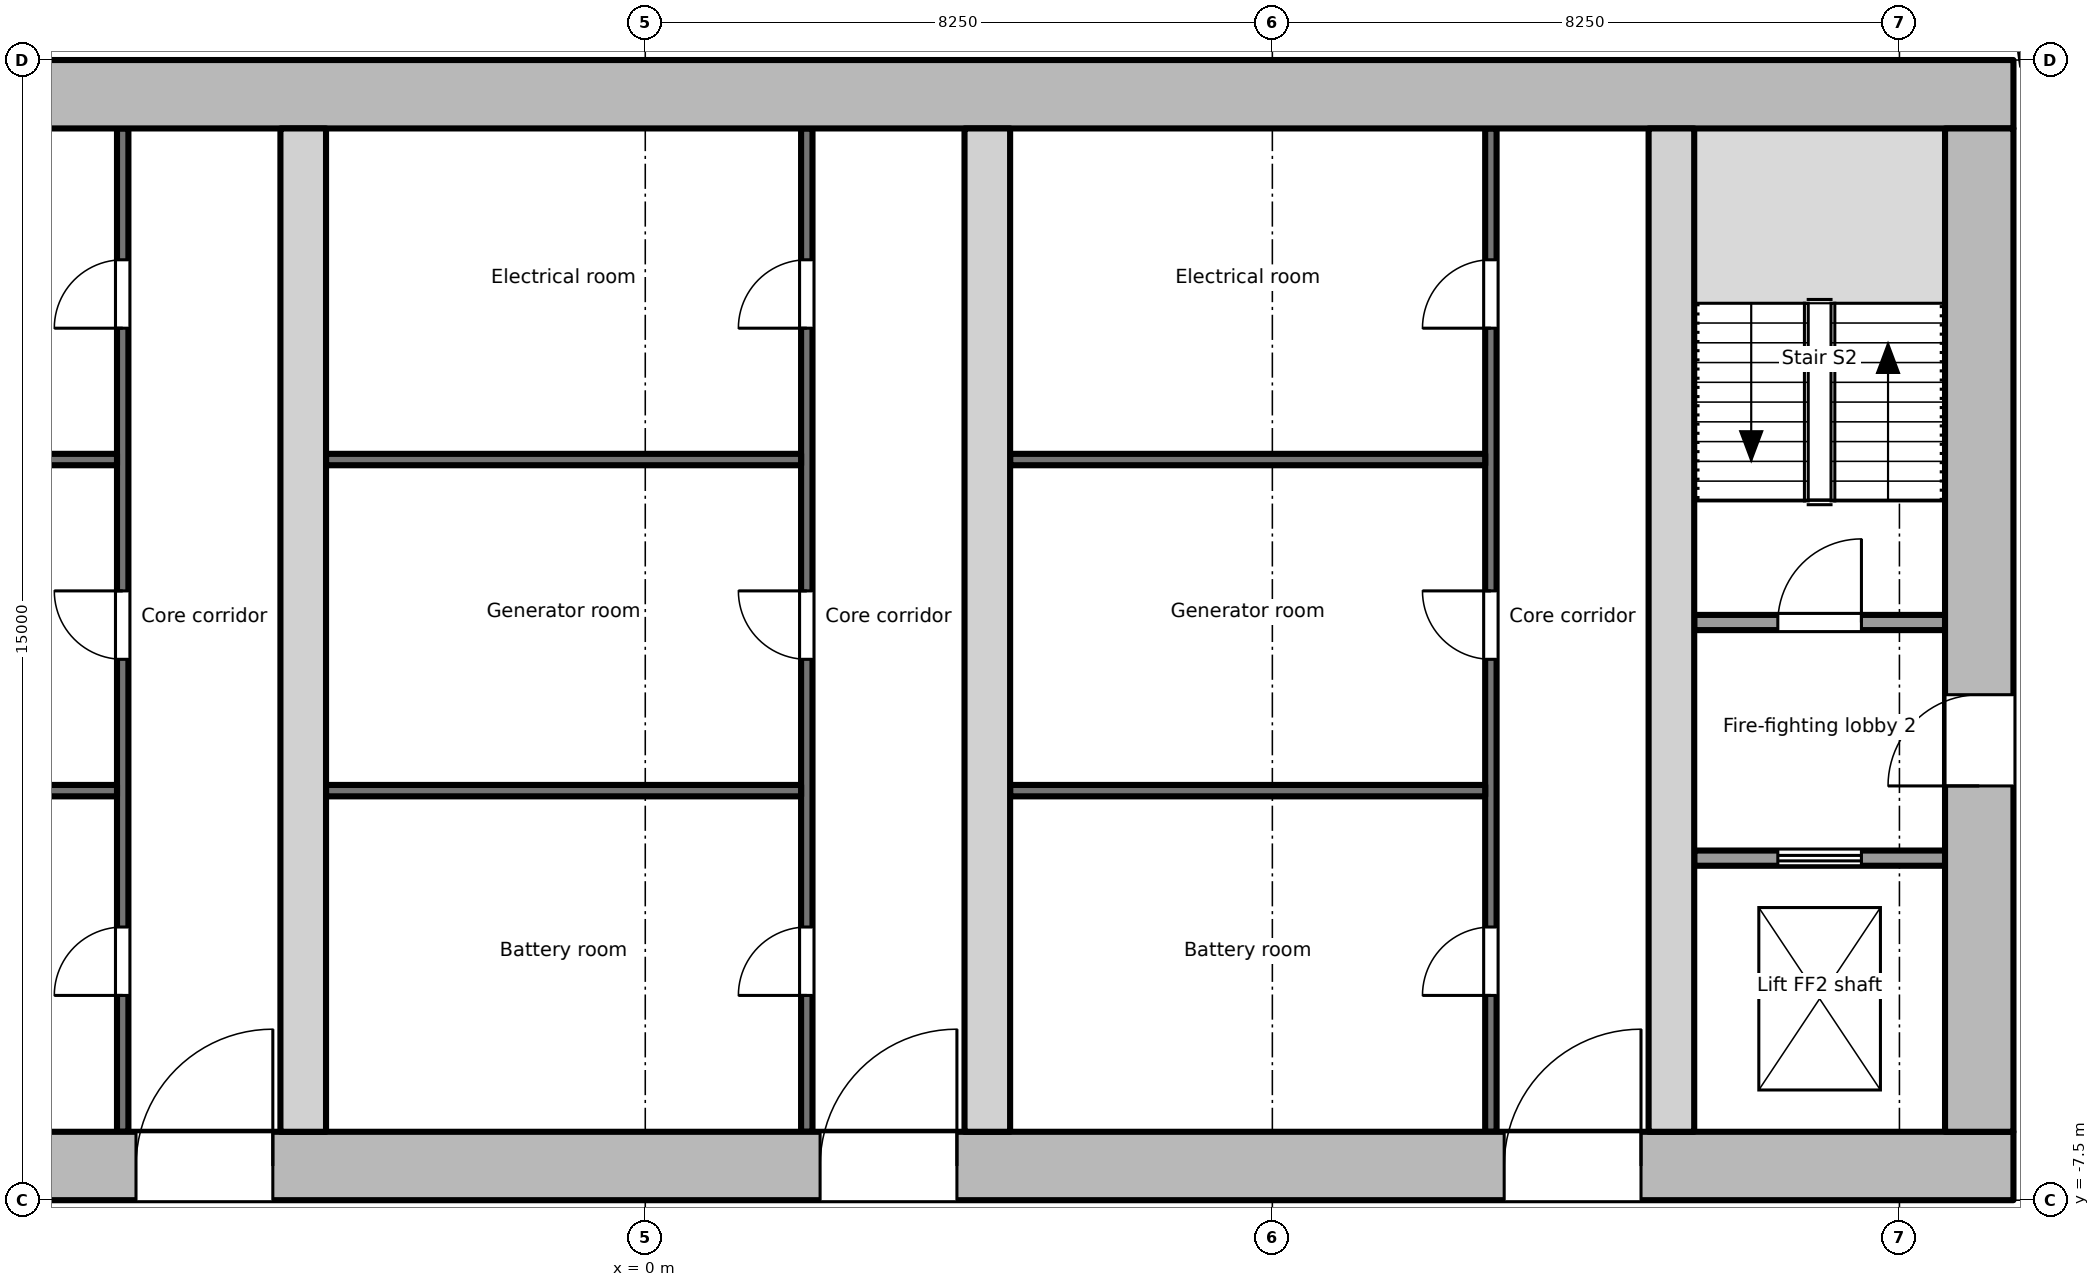
"""IFC4 building model, lengths in metres.
Left out: names, types, materials, properties, quantities, classifications, styles, units other than length and angle.
Written with IfcOpenShell. Run it as: python <this file> out.ifc"""

import sys

from ifc_helpers import new_model, si_unit, direction, frame, frame_2d, origin, place, context, subcontext, project, spatial, rectangle, extrude, element, fill, save


model = new_model("IFC4")
c1 = context("Model", 3, precision=1e-05, world=origin(), true_north=direction((0.0, 1.0)))
c2 = subcontext(c1, "Body", "Model", "MODEL_VIEW")
j1 = project(units=[si_unit("LENGTHUNIT", "METRE"), si_unit("PLANEANGLEUNIT", "RADIAN")], contexts=[c1])
p1 = place(None, origin())
s1 = spatial("IfcSite", under=j1, at=p1, CompositionType="ELEMENT")
p2 = place(p1, origin())
s2 = spatial("IfcBuilding", under=s1, at=p2, CompositionType="ELEMENT")
p3 = place(p2, frame((0.0, 0.0, 296.3)))
s3 = spatial("IfcBuildingStorey", under=s2, at=p3, CompositionType="ELEMENT", Elevation=296.3)
p4 = place(p3, frame((-18.0, -7.05, -0.2), z_axis=(0.0, 0.0, 1.0), x_axis=(1.0, 0.0, 0.0)))
e1 = element("IfcWall", 1, at=p4, inside=s3, PredefinedType="SHEAR", context=c2, shape_type="SweptSolid", body=[
    extrude(rectangle(XDim=36.0, YDim=0.9, at=frame_2d((18.0, 0.0))), origin(), (0.0, 0.0, 1.0), 4.0),
])
p5 = place(p4, frame((11.3, 0.0, 0.2)))
e2 = element("IfcOpeningElement", 2, at=p5, cuts=e1, PredefinedType="OPENING", context=c2, shape_type="SweptSolid", body=[
    extrude(rectangle(XDim=1.8, YDim=2.1, at=frame_2d((0.9, 1.05))), frame((0.0, 0.46, 0.0), z_axis=(0.0, -1.0, 0.0), x_axis=(1.0, 0.0, 0.0)), (0.0, 0.0, 1.0), 0.921),
])
p6 = place(p4, frame((20.3, 0.0, 0.2)))
e3 = element("IfcOpeningElement", 3, at=p6, cuts=e1, PredefinedType="OPENING", context=c2, shape_type="SweptSolid", body=[
    extrude(rectangle(XDim=1.8, YDim=2.1, at=frame_2d((0.9, 1.05))), frame((0.0, 0.46, 0.0), z_axis=(0.0, -1.0, 0.0), x_axis=(1.0, 0.0, 0.0)), (0.0, 0.0, 1.0), 0.921),
])
p7 = place(p4, frame((29.3, 0.0, 0.2)))
e4 = element("IfcOpeningElement", 4, at=p7, cuts=e1, PredefinedType="OPENING", context=c2, shape_type="SweptSolid", body=[
    extrude(rectangle(XDim=1.8, YDim=2.1, at=frame_2d((0.9, 1.05))), frame((0.0, 0.46, 0.0), z_axis=(0.0, -1.0, 0.0), x_axis=(1.0, 0.0, 0.0)), (0.0, 0.0, 1.0), 0.921),
])
p8 = place(p3, frame((-18.0, 7.05, -0.2), z_axis=(0.0, 0.0, 1.0), x_axis=(1.0, 0.0, 0.0)))
e5 = element("IfcWall", 5, at=p8, inside=s3, PredefinedType="SHEAR", context=c2, shape_type="SweptSolid", body=[
    extrude(rectangle(XDim=36.0, YDim=0.9, at=frame_2d((18.0, 0.0))), origin(), (0.0, 0.0, 1.0), 4.0),
])
p9 = place(p3, frame((17.55, -6.6, -0.2), z_axis=(0.0, 0.0, 1.0), x_axis=(0.0, 1.0, 0.0)))
e6 = element("IfcWall", 6, at=p9, inside=s3, PredefinedType="SHEAR", context=c2, shape_type="SweptSolid", body=[
    extrude(rectangle(XDim=13.2, YDim=0.9, at=frame_2d((6.6, 0.0))), origin(), (0.0, 0.0, 1.0), 4.0),
])
p10 = place(p9, frame((4.55, 0.0, 0.2)))
e7 = element("IfcOpeningElement", 7, at=p10, cuts=e6, PredefinedType="OPENING", context=c2, shape_type="SweptSolid", body=[
    extrude(rectangle(XDim=1.2, YDim=2.1, at=frame_2d((0.6, 1.05))), frame((0.0, 0.46, 0.0), z_axis=(0.0, -1.0, 0.0), x_axis=(1.0, 0.0, 0.0)), (0.0, 0.0, 1.0), 0.921),
])
for number, where, z_axis, x_axis in (
    (8, (-4.5, -6.6, -0.2), (0.0, 0.0, 1.0), (0.0, 1.0, 0.0)),
    (9, (4.5, -6.6, -0.2), (0.0, 0.0, 1.0), (0.0, 1.0, 0.0)),
    (10, (13.5, -6.6, -0.2), (0.0, 0.0, 1.0), (0.0, 1.0, 0.0)),
):
    element("IfcWall", number, at=place(p3, frame(where, z_axis=z_axis, x_axis=x_axis)), inside=s3, PredefinedType="SHEAR", context=c2, shape_type="SweptSolid", body=[
        extrude(rectangle(XDim=13.2, YDim=0.6, at=frame_2d((6.6, 0.0))), origin(), (0.0, 0.0, 1.0), 4.0),
    ])
p11 = place(p3, frame((13.8, -3.0, 0.0), z_axis=(0.0, 0.0, 1.0), x_axis=(1.0, 0.0, 0.0)))
e11 = element("IfcWall", 11, at=p11, inside=s3, PredefinedType="PARTITIONING", context=c2, shape_type="SweptSolid", body=[
    extrude(rectangle(XDim=3.3, YDim=0.2, at=frame_2d((1.65, 0.0))), origin(), (0.0, 0.0, 1.0), 3.8),
])
p12 = place(p11, frame((1.1, 0.0, 0.0)))
e12 = element("IfcOpeningElement", 12, at=p12, cuts=e11, PredefinedType="OPENING", context=c2, shape_type="SweptSolid", body=[
    extrude(rectangle(XDim=1.1, YDim=2.1, at=frame_2d((0.55, 1.05))), frame((0.0, 0.111, 0.0), z_axis=(0.0, -1.0, 0.0), x_axis=(1.0, 0.0, 0.0)), (0.0, 0.0, 1.0), 0.221),
])
p13 = place(p3, frame((13.8, 0.1, 0.0), z_axis=(0.0, 0.0, 1.0), x_axis=(1.0, 0.0, 0.0)))
e13 = element("IfcWall", 13, at=p13, inside=s3, PredefinedType="PARTITIONING", context=c2, shape_type="SweptSolid", body=[
    extrude(rectangle(XDim=3.3, YDim=0.2, at=frame_2d((1.65, 0.0))), origin(), (0.0, 0.0, 1.0), 3.8),
])
p14 = place(p13, frame((1.1, 0.0, 0.0)))
e14 = element("IfcOpeningElement", 14, at=p14, cuts=e13, PredefinedType="OPENING", context=c2, shape_type="SweptSolid", body=[
    extrude(rectangle(XDim=1.1, YDim=2.1, at=frame_2d((0.55, 1.05))), frame((0.0, 0.111, 0.0), z_axis=(0.0, -1.0, 0.0), x_axis=(1.0, 0.0, 0.0)), (0.0, 0.0, 1.0), 0.221),
])
p15 = place(p3, frame((-6.875, -6.6, 0.0), z_axis=(0.0, 0.0, 1.0), x_axis=(0.0, 1.0, 0.0)))
e15 = element("IfcWall", 15, at=p15, inside=s3, PredefinedType="PARTITIONING", context=c2, shape_type="SweptSolid", body=[
    extrude(rectangle(XDim=13.2, YDim=0.15, at=frame_2d((6.6, 0.0))), origin(), (0.0, 0.0, 1.0), 3.8),
])
p16 = place(p15, frame((1.794, 0.0, 0.0)))
e16 = element("IfcOpeningElement", 16, at=p16, cuts=e15, PredefinedType="OPENING", context=c2, shape_type="SweptSolid", body=[
    extrude(rectangle(XDim=0.9, YDim=2.1, at=frame_2d((0.45, 1.05))), frame((0.0, 0.085, 0.0), z_axis=(0.0, -1.0, 0.0), x_axis=(1.0, 0.0, 0.0)), (0.0, 0.0, 1.0), 0.171),
])
p17 = place(p15, frame((6.216, 0.0, 0.0)))
e17 = element("IfcOpeningElement", 17, at=p17, cuts=e15, PredefinedType="OPENING", context=c2, shape_type="SweptSolid", body=[
    extrude(rectangle(XDim=0.9, YDim=2.1, at=frame_2d((0.45, 1.05))), frame((0.0, 0.085, 0.0), z_axis=(0.0, -1.0, 0.0), x_axis=(1.0, 0.0, 0.0)), (0.0, 0.0, 1.0), 0.171),
])
p18 = place(p15, frame((10.572, 0.0, 0.0)))
e18 = element("IfcOpeningElement", 18, at=p18, cuts=e15, PredefinedType="OPENING", context=c2, shape_type="SweptSolid", body=[
    extrude(rectangle(XDim=0.9, YDim=2.1, at=frame_2d((0.45, 1.05))), frame((0.0, 0.085, 0.0), z_axis=(0.0, -1.0, 0.0), x_axis=(1.0, 0.0, 0.0)), (0.0, 0.0, 1.0), 0.171),
])
for number, where, z_axis, x_axis in (
    (19, (-13.2, -2.112, 0.0), (0.0, 0.0, 1.0), (1.0, 0.0, 0.0)),
    (20, (-13.2, 2.244, 0.0), (0.0, 0.0, 1.0), (1.0, 0.0, 0.0)),
):
    element("IfcWall", number, at=place(p3, frame(where, z_axis=z_axis, x_axis=x_axis)), inside=s3, PredefinedType="PARTITIONING", context=c2, shape_type="SweptSolid", body=[
        extrude(rectangle(XDim=6.25, YDim=0.15, at=frame_2d((3.125, 0.0))), origin(), (0.0, 0.0, 1.0), 3.8),
    ])
p19 = place(p3, frame((2.125, -6.6, 0.0), z_axis=(0.0, 0.0, 1.0), x_axis=(0.0, 1.0, 0.0)))
e21 = element("IfcWall", 21, at=p19, inside=s3, PredefinedType="PARTITIONING", context=c2, shape_type="SweptSolid", body=[
    extrude(rectangle(XDim=13.2, YDim=0.15, at=frame_2d((6.6, 0.0))), origin(), (0.0, 0.0, 1.0), 3.8),
])
p20 = place(p19, frame((1.794, 0.0, 0.0)))
e22 = element("IfcOpeningElement", 22, at=p20, cuts=e21, PredefinedType="OPENING", context=c2, shape_type="SweptSolid", body=[
    extrude(rectangle(XDim=0.9, YDim=2.1, at=frame_2d((0.45, 1.05))), frame((0.0, 0.085, 0.0), z_axis=(0.0, -1.0, 0.0), x_axis=(1.0, 0.0, 0.0)), (0.0, 0.0, 1.0), 0.171),
])
p21 = place(p19, frame((6.216, 0.0, 0.0)))
e23 = element("IfcOpeningElement", 23, at=p21, cuts=e21, PredefinedType="OPENING", context=c2, shape_type="SweptSolid", body=[
    extrude(rectangle(XDim=0.9, YDim=2.1, at=frame_2d((0.45, 1.05))), frame((0.0, 0.085, 0.0), z_axis=(0.0, -1.0, 0.0), x_axis=(1.0, 0.0, 0.0)), (0.0, 0.0, 1.0), 0.171),
])
p22 = place(p19, frame((10.572, 0.0, 0.0)))
e24 = element("IfcOpeningElement", 24, at=p22, cuts=e21, PredefinedType="OPENING", context=c2, shape_type="SweptSolid", body=[
    extrude(rectangle(XDim=0.9, YDim=2.1, at=frame_2d((0.45, 1.05))), frame((0.0, 0.085, 0.0), z_axis=(0.0, -1.0, 0.0), x_axis=(1.0, 0.0, 0.0)), (0.0, 0.0, 1.0), 0.171),
])
for number, where, z_axis, x_axis in (
    (25, (-4.2, -2.112, 0.0), (0.0, 0.0, 1.0), (1.0, 0.0, 0.0)),
    (26, (-4.2, 2.244, 0.0), (0.0, 0.0, 1.0), (1.0, 0.0, 0.0)),
):
    element("IfcWall", number, at=place(p3, frame(where, z_axis=z_axis, x_axis=x_axis)), inside=s3, PredefinedType="PARTITIONING", context=c2, shape_type="SweptSolid", body=[
        extrude(rectangle(XDim=6.25, YDim=0.15, at=frame_2d((3.125, 0.0))), origin(), (0.0, 0.0, 1.0), 3.8),
    ])
p23 = place(p3, frame((11.125, -6.6, 0.0), z_axis=(0.0, 0.0, 1.0), x_axis=(0.0, 1.0, 0.0)))
e27 = element("IfcWall", 27, at=p23, inside=s3, PredefinedType="PARTITIONING", context=c2, shape_type="SweptSolid", body=[
    extrude(rectangle(XDim=13.2, YDim=0.15, at=frame_2d((6.6, 0.0))), origin(), (0.0, 0.0, 1.0), 3.8),
])
p24 = place(p23, frame((1.794, 0.0, 0.0)))
e28 = element("IfcOpeningElement", 28, at=p24, cuts=e27, PredefinedType="OPENING", context=c2, shape_type="SweptSolid", body=[
    extrude(rectangle(XDim=0.9, YDim=2.1, at=frame_2d((0.45, 1.05))), frame((0.0, 0.085, 0.0), z_axis=(0.0, -1.0, 0.0), x_axis=(1.0, 0.0, 0.0)), (0.0, 0.0, 1.0), 0.171),
])
p25 = place(p23, frame((6.216, 0.0, 0.0)))
e29 = element("IfcOpeningElement", 29, at=p25, cuts=e27, PredefinedType="OPENING", context=c2, shape_type="SweptSolid", body=[
    extrude(rectangle(XDim=0.9, YDim=2.1, at=frame_2d((0.45, 1.05))), frame((0.0, 0.085, 0.0), z_axis=(0.0, -1.0, 0.0), x_axis=(1.0, 0.0, 0.0)), (0.0, 0.0, 1.0), 0.171),
])
p26 = place(p23, frame((10.572, 0.0, 0.0)))
e30 = element("IfcOpeningElement", 30, at=p26, cuts=e27, PredefinedType="OPENING", context=c2, shape_type="SweptSolid", body=[
    extrude(rectangle(XDim=0.9, YDim=2.1, at=frame_2d((0.45, 1.05))), frame((0.0, 0.085, 0.0), z_axis=(0.0, -1.0, 0.0), x_axis=(1.0, 0.0, 0.0)), (0.0, 0.0, 1.0), 0.171),
])
for number, where, z_axis, x_axis in (
    (31, (4.8, -2.112, 0.0), (0.0, 0.0, 1.0), (1.0, 0.0, 0.0)),
    (32, (4.8, 2.244, 0.0), (0.0, 0.0, 1.0), (1.0, 0.0, 0.0)),
):
    element("IfcWall", number, at=place(p3, frame(where, z_axis=z_axis, x_axis=x_axis)), inside=s3, PredefinedType="PARTITIONING", context=c2, shape_type="SweptSolid", body=[
        extrude(rectangle(XDim=6.25, YDim=0.15, at=frame_2d((3.125, 0.0))), origin(), (0.0, 0.0, 1.0), 3.8),
    ])
p27 = place(p12, origin())
e33 = element("IfcDoor", 33, at=p27, inside=s3, OperationType="DOUBLE_DOOR_SLIDING", PredefinedType="DOOR", context=c2, shape_type="SweptSolid", body=[
    extrude(rectangle(XDim=1.1, YDim=2.1, at=frame_2d((0.55, 1.05))), frame((0.0, 0.025, 0.0), z_axis=(0.0, -1.0, 0.0), x_axis=(1.0, 0.0, 0.0)), (0.0, 0.0, 1.0), 0.05),
])
fill(e12, e33)
p28 = place(p10, origin())
e34 = element("IfcDoor", 34, at=p28, inside=s3, OperationType="SINGLE_SWING_LEFT", PredefinedType="DOOR", context=c2, shape_type="SweptSolid", body=[
    extrude(rectangle(XDim=1.2, YDim=2.1, at=frame_2d((0.6, 1.05))), frame((0.0, 0.025, 0.0), z_axis=(0.0, -1.0, 0.0), x_axis=(1.0, 0.0, 0.0)), (0.0, 0.0, 1.0), 0.05),
])
fill(e7, e34)
p29 = place(p14, origin())
e35 = element("IfcDoor", 35, at=p29, inside=s3, OperationType="SINGLE_SWING_RIGHT", PredefinedType="DOOR", context=c2, shape_type="SweptSolid", body=[
    extrude(rectangle(XDim=1.1, YDim=2.1, at=frame_2d((0.55, 1.05))), frame((0.0, 0.025, 0.0), z_axis=(0.0, -1.0, 0.0), x_axis=(1.0, 0.0, 0.0)), (0.0, 0.0, 1.0), 0.05),
])
fill(e14, e35)
p30 = place(p16, origin())
e36 = element("IfcDoor", 36, at=p30, inside=s3, OperationType="SINGLE_SWING_LEFT", PredefinedType="DOOR", context=c2, shape_type="SweptSolid", body=[
    extrude(rectangle(XDim=0.9, YDim=2.1, at=frame_2d((0.45, 1.05))), frame((0.0, 0.025, 0.0), z_axis=(0.0, -1.0, 0.0), x_axis=(1.0, 0.0, 0.0)), (0.0, 0.0, 1.0), 0.05),
])
fill(e16, e36)
p31 = place(p17, origin())
e37 = element("IfcDoor", 37, at=p31, inside=s3, OperationType="SINGLE_SWING_RIGHT", PredefinedType="DOOR", context=c2, shape_type="SweptSolid", body=[
    extrude(rectangle(XDim=0.9, YDim=2.1, at=frame_2d((0.45, 1.05))), frame((0.0, 0.025, 0.0), z_axis=(0.0, -1.0, 0.0), x_axis=(1.0, 0.0, 0.0)), (0.0, 0.0, 1.0), 0.05),
])
fill(e17, e37)
p32 = place(p18, origin())
e38 = element("IfcDoor", 38, at=p32, inside=s3, OperationType="SINGLE_SWING_LEFT", PredefinedType="DOOR", context=c2, shape_type="SweptSolid", body=[
    extrude(rectangle(XDim=0.9, YDim=2.1, at=frame_2d((0.45, 1.05))), frame((0.0, 0.025, 0.0), z_axis=(0.0, -1.0, 0.0), x_axis=(1.0, 0.0, 0.0)), (0.0, 0.0, 1.0), 0.05),
])
fill(e18, e38)
p33 = place(p5, origin())
e39 = element("IfcDoor", 39, at=p33, inside=s3, OperationType="SINGLE_SWING_RIGHT", PredefinedType="DOOR", context=c2, shape_type="SweptSolid", body=[
    extrude(rectangle(XDim=1.8, YDim=2.1, at=frame_2d((0.9, 1.05))), frame((0.0, 0.025, 0.0), z_axis=(0.0, -1.0, 0.0), x_axis=(1.0, 0.0, 0.0)), (0.0, 0.0, 1.0), 0.05),
])
fill(e2, e39)
p34 = place(p20, origin())
e40 = element("IfcDoor", 40, at=p34, inside=s3, OperationType="SINGLE_SWING_LEFT", PredefinedType="DOOR", context=c2, shape_type="SweptSolid", body=[
    extrude(rectangle(XDim=0.9, YDim=2.1, at=frame_2d((0.45, 1.05))), frame((0.0, 0.025, 0.0), z_axis=(0.0, -1.0, 0.0), x_axis=(1.0, 0.0, 0.0)), (0.0, 0.0, 1.0), 0.05),
])
fill(e22, e40)
p35 = place(p21, origin())
e41 = element("IfcDoor", 41, at=p35, inside=s3, OperationType="SINGLE_SWING_RIGHT", PredefinedType="DOOR", context=c2, shape_type="SweptSolid", body=[
    extrude(rectangle(XDim=0.9, YDim=2.1, at=frame_2d((0.45, 1.05))), frame((0.0, 0.025, 0.0), z_axis=(0.0, -1.0, 0.0), x_axis=(1.0, 0.0, 0.0)), (0.0, 0.0, 1.0), 0.05),
])
fill(e23, e41)
p36 = place(p22, origin())
e42 = element("IfcDoor", 42, at=p36, inside=s3, OperationType="SINGLE_SWING_LEFT", PredefinedType="DOOR", context=c2, shape_type="SweptSolid", body=[
    extrude(rectangle(XDim=0.9, YDim=2.1, at=frame_2d((0.45, 1.05))), frame((0.0, 0.025, 0.0), z_axis=(0.0, -1.0, 0.0), x_axis=(1.0, 0.0, 0.0)), (0.0, 0.0, 1.0), 0.05),
])
fill(e24, e42)
p37 = place(p6, origin())
e43 = element("IfcDoor", 43, at=p37, inside=s3, OperationType="SINGLE_SWING_RIGHT", PredefinedType="DOOR", context=c2, shape_type="SweptSolid", body=[
    extrude(rectangle(XDim=1.8, YDim=2.1, at=frame_2d((0.9, 1.05))), frame((0.0, 0.025, 0.0), z_axis=(0.0, -1.0, 0.0), x_axis=(1.0, 0.0, 0.0)), (0.0, 0.0, 1.0), 0.05),
])
fill(e3, e43)
p38 = place(p24, origin())
e44 = element("IfcDoor", 44, at=p38, inside=s3, OperationType="SINGLE_SWING_LEFT", PredefinedType="DOOR", context=c2, shape_type="SweptSolid", body=[
    extrude(rectangle(XDim=0.9, YDim=2.1, at=frame_2d((0.45, 1.05))), frame((0.0, 0.025, 0.0), z_axis=(0.0, -1.0, 0.0), x_axis=(1.0, 0.0, 0.0)), (0.0, 0.0, 1.0), 0.05),
])
fill(e28, e44)
p39 = place(p25, origin())
e45 = element("IfcDoor", 45, at=p39, inside=s3, OperationType="SINGLE_SWING_RIGHT", PredefinedType="DOOR", context=c2, shape_type="SweptSolid", body=[
    extrude(rectangle(XDim=0.9, YDim=2.1, at=frame_2d((0.45, 1.05))), frame((0.0, 0.025, 0.0), z_axis=(0.0, -1.0, 0.0), x_axis=(1.0, 0.0, 0.0)), (0.0, 0.0, 1.0), 0.05),
])
fill(e29, e45)
p40 = place(p26, origin())
e46 = element("IfcDoor", 46, at=p40, inside=s3, OperationType="SINGLE_SWING_LEFT", PredefinedType="DOOR", context=c2, shape_type="SweptSolid", body=[
    extrude(rectangle(XDim=0.9, YDim=2.1, at=frame_2d((0.45, 1.05))), frame((0.0, 0.025, 0.0), z_axis=(0.0, -1.0, 0.0), x_axis=(1.0, 0.0, 0.0)), (0.0, 0.0, 1.0), 0.05),
])
fill(e30, e46)
p41 = place(p7, origin())
e47 = element("IfcDoor", 47, at=p41, inside=s3, OperationType="SINGLE_SWING_RIGHT", PredefinedType="DOOR", context=c2, shape_type="SweptSolid", body=[
    extrude(rectangle(XDim=1.8, YDim=2.1, at=frame_2d((0.9, 1.05))), frame((0.0, 0.025, 0.0), z_axis=(0.0, -1.0, 0.0), x_axis=(1.0, 0.0, 0.0)), (0.0, 0.0, 1.0), 0.05),
])
fill(e4, e47)
save(model, sys.argv[1])
